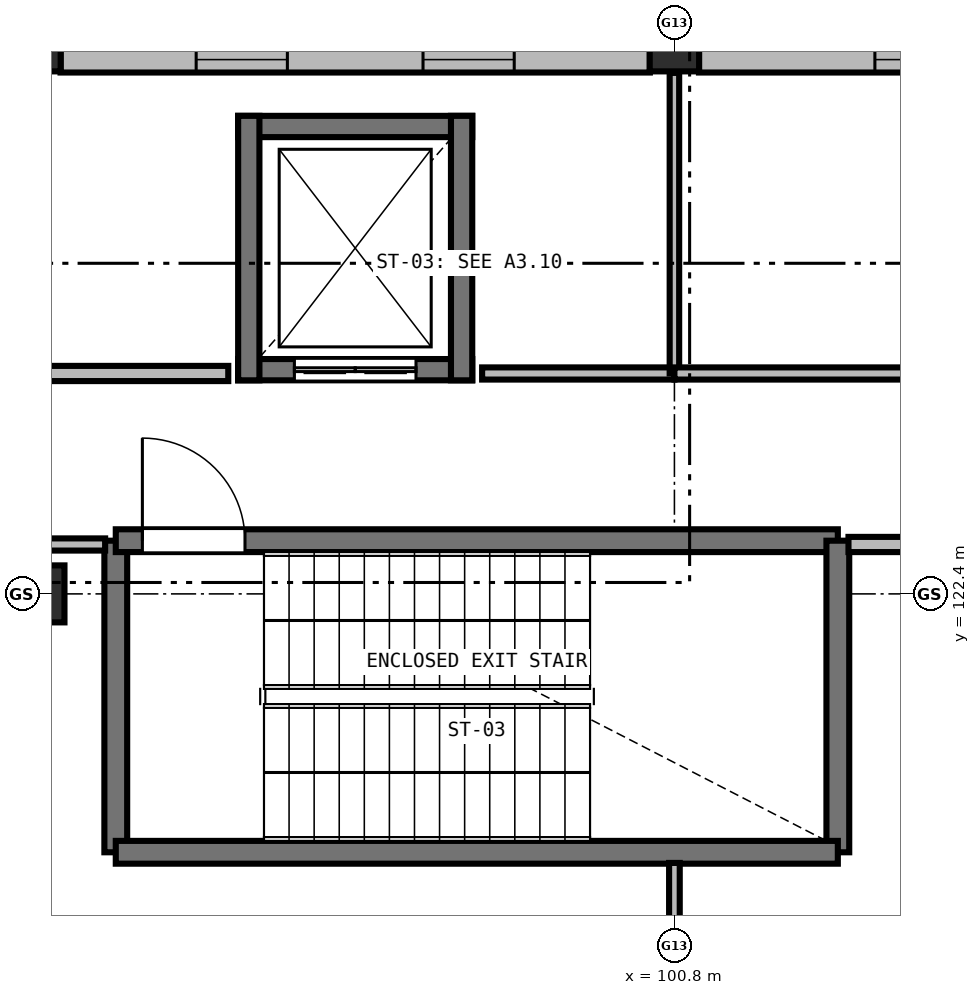
"""IFC4 building model, lengths in metres.
Left out: names, types, materials, properties, quantities, classifications, styles, units other than length and angle.
Written with IfcOpenShell. Run it as: python <this file> out.ifc"""

import sys

from ifc_helpers import new_model, si_unit, direction, frame, frame_2d, origin, origin_2d, place, context, subcontext, project, spatial, rectangle, extrude, element, fill, save


model = new_model("IFC4")
c1 = context("Model", 3, precision=1e-05, world=origin(), true_north=direction((0.0, 1.0)))
c2 = subcontext(c1, "Body", "Model", "MODEL_VIEW")
j1 = project(units=[si_unit("LENGTHUNIT", "METRE"), si_unit("PLANEANGLEUNIT", "RADIAN")], contexts=[c1])
p1 = place(None, origin())
s1 = spatial("IfcSite", under=j1, at=p1, CompositionType="ELEMENT")
p2 = place(p1, origin())
s2 = spatial("IfcBuilding", under=s1, at=p2, CompositionType="ELEMENT")
p3 = place(p2, frame((0.0, 0.0, 9.3)))
s3 = spatial("IfcBuildingStorey", under=s2, at=p3, CompositionType="ELEMENT", Elevation=9.3)
p4 = place(p3, frame((92.4, 122.4, 0.0), z_axis=(0.0, 0.0, 1.0), x_axis=(1.0, 0.0, 0.0)))
e1 = element("IfcColumn", 1, at=p4, inside=s3, PredefinedType="COLUMN", context=c2, shape_type="SweptSolid", body=[
    extrude(rectangle(XDim=0.75, YDim=0.75, at=origin_2d()), origin(), (0.0, 0.0, 1.0), 4.2),
])
for number, where, z_axis, x_axis in (
    (2, (92.4, 129.6, 0.0), (0.0, 0.0, 1.0), (1.0, 0.0, 0.0)),
    (3, (100.8, 129.6, 0.0), (0.0, 0.0, 1.0), (1.0, 0.0, 0.0)),
):
    element("IfcColumn", number, at=place(p3, frame(where, z_axis=z_axis, x_axis=x_axis)), inside=s3, PredefinedType="COLUMN", context=c2, shape_type="SweptSolid", body=[
        extrude(rectangle(XDim=0.65, YDim=0.65, at=origin_2d()), origin(), (0.0, 0.0, 1.0), 4.2),
    ])
p5 = place(p3, frame((92.723, 129.43, 0.0), z_axis=(0.0, 0.0, 1.0), x_axis=(1.0, 0.0, 0.0)))
e4 = element("IfcWall", 4, at=p5, inside=s3, PredefinedType="SOLIDWALL", context=c2, shape_type="SweptSolid", body=[
    extrude(rectangle(XDim=7.754, YDim=0.34, at=frame_2d((3.877, 0.0))), origin(), (0.0, 0.0, 1.0), 3.18),
])
p6 = place(p5, frame((1.785, 0.0, 0.95)))
e5 = element("IfcOpeningElement", 5, at=p6, cuts=e4, PredefinedType="OPENING", context=c2, shape_type="SweptSolid", body=[
    extrude(rectangle(XDim=1.2, YDim=1.8, at=frame_2d((0.6, 0.9))), frame((0.0, 0.18, 0.0), z_axis=(0.0, -1.0, 0.0), x_axis=(1.0, 0.0, 0.0)), (0.0, 0.0, 1.0), 0.36),
])
p7 = place(p5, frame((4.769, 0.0, 0.95)))
e6 = element("IfcOpeningElement", 6, at=p7, cuts=e4, PredefinedType="OPENING", context=c2, shape_type="SweptSolid", body=[
    extrude(rectangle(XDim=1.2, YDim=1.8, at=frame_2d((0.6, 0.9))), frame((0.0, 0.18, 0.0), z_axis=(0.0, -1.0, 0.0), x_axis=(1.0, 0.0, 0.0)), (0.0, 0.0, 1.0), 0.36),
])
p8 = place(p3, frame((101.123, 129.43, 0.0), z_axis=(0.0, 0.0, 1.0), x_axis=(1.0, 0.0, 0.0)))
e7 = element("IfcWall", 7, at=p8, inside=s3, PredefinedType="SOLIDWALL", context=c2, shape_type="SweptSolid", body=[
    extrude(rectangle(XDim=7.829, YDim=0.34, at=frame_2d((3.915, 0.0))), origin(), (0.0, 0.0, 1.0), 3.18),
])
p9 = place(p8, frame((2.314, 0.0, 0.95)))
e8 = element("IfcOpeningElement", 8, at=p9, cuts=e7, PredefinedType="OPENING", context=c2, shape_type="SweptSolid", body=[
    extrude(rectangle(XDim=3.2, YDim=1.98, at=frame_2d((1.6, 0.99))), frame((0.0, 0.18, 0.0), z_axis=(0.0, -1.0, 0.0), x_axis=(1.0, 0.0, 0.0)), (0.0, 0.0, 1.0), 0.36),
])
p10 = place(p3, frame((93.45, 119.0, 0.0), z_axis=(0.0, 0.0, 1.0), x_axis=(0.0, 1.0, 0.0)))
e9 = element("IfcWall", 9, at=p10, inside=s3, PredefinedType="SHEAR", context=c2, shape_type="SweptSolid", body=[
    extrude(rectangle(XDim=4.1, YDim=0.3, at=frame_2d((2.05, 0.0))), origin(), (0.0, 0.0, 1.0), 3.94),
])
p11 = place(p3, frame((93.45, 123.1, 0.0), z_axis=(0.0, 0.0, 1.0), x_axis=(1.0, 0.0, 0.0)))
e10 = element("IfcWall", 10, at=p11, inside=s3, PredefinedType="SHEAR", context=c2, shape_type="SweptSolid", body=[
    extrude(rectangle(XDim=9.5, YDim=0.3, at=frame_2d((4.75, 0.0))), origin(), (0.0, 0.0, 1.0), 3.94),
])
p12 = place(p11, frame((0.35, 0.0, 0.0)))
e11 = element("IfcOpeningElement", 11, at=p12, cuts=e10, PredefinedType="OPENING", context=c2, shape_type="SweptSolid", body=[
    extrude(rectangle(XDim=1.35, YDim=2.2, at=frame_2d((0.675, 1.1))), frame((0.0, 0.16, 0.0), z_axis=(0.0, -1.0, 0.0), x_axis=(1.0, 0.0, 0.0)), (0.0, 0.0, 1.0), 0.32),
])
p13 = place(p3, frame((102.95, 123.1, 0.0), z_axis=(0.0, 0.0, 1.0), x_axis=(0.0, -1.0, 0.0)))
e12 = element("IfcWall", 12, at=p13, inside=s3, PredefinedType="SHEAR", context=c2, shape_type="SweptSolid", body=[
    extrude(rectangle(XDim=4.1, YDim=0.3, at=frame_2d((2.05, 0.0))), origin(), (0.0, 0.0, 1.0), 3.94),
])
p14 = place(p3, frame((102.95, 119.0, 0.0), z_axis=(0.0, 0.0, 1.0), x_axis=(-1.0, 0.0, 0.0)))
e13 = element("IfcWall", 13, at=p14, inside=s3, PredefinedType="SHEAR", context=c2, shape_type="SweptSolid", body=[
    extrude(rectangle(XDim=9.5, YDim=0.3, at=frame_2d((4.75, 0.0))), origin(), (0.0, 0.0, 1.0), 3.94),
])
p15 = place(p3, frame((98.14, 125.35, 0.0), z_axis=(0.0, 0.0, 1.0), x_axis=(-1.0, 0.0, 0.0)))
e14 = element("IfcWall", 14, at=p15, inside=s3, PredefinedType="SHEAR", context=c2, shape_type="SweptSolid", body=[
    extrude(rectangle(XDim=3.08, YDim=0.28, at=frame_2d((1.54, 0.0))), origin(), (0.0, 0.0, 1.0), 3.94),
])
p16 = place(p15, frame((0.74, 0.0, 0.0)))
e15 = element("IfcOpeningElement", 15, at=p16, cuts=e14, PredefinedType="OPENING", context=c2, shape_type="SweptSolid", body=[
    extrude(rectangle(XDim=1.6, YDim=2.2, at=frame_2d((0.8, 1.1))), frame((0.0, 0.15, 0.0), z_axis=(0.0, -1.0, 0.0), x_axis=(1.0, 0.0, 0.0)), (0.0, 0.0, 1.0), 0.3),
])
p17 = place(p3, frame((95.06, 128.55, 0.0), z_axis=(0.0, 0.0, 1.0), x_axis=(1.0, 0.0, 0.0)))
e16 = element("IfcWall", 16, at=p17, inside=s3, PredefinedType="SHEAR", context=c2, shape_type="SweptSolid", body=[
    extrude(rectangle(XDim=3.08, YDim=0.28, at=frame_2d((1.54, 0.0))), origin(), (0.0, 0.0, 1.0), 3.94),
])
for number, where, z_axis, x_axis in (
    (17, (95.2, 125.21, 0.0), (0.0, 0.0, 1.0), (0.0, 1.0, 0.0)),
    (18, (98.0, 128.69, 0.0), (0.0, 0.0, 1.0), (0.0, -1.0, 0.0)),
):
    element("IfcWall", number, at=place(p3, frame(where, z_axis=z_axis, x_axis=x_axis)), inside=s3, PredefinedType="SHEAR", context=c2, shape_type="SweptSolid", body=[
        extrude(rectangle(XDim=3.48, YDim=0.28, at=frame_2d((1.74, 0.0))), origin(), (0.0, 0.0, 1.0), 3.94),
    ])
p18 = place(p3, frame((58.8, 125.3, 0.0), z_axis=(0.0, 0.0, 1.0), x_axis=(1.0, 0.0, 0.0)))
e19 = element("IfcWall", 19, at=p18, inside=s3, PredefinedType="SOLIDWALL", context=c2, shape_type="SweptSolid", body=[
    extrude(rectangle(XDim=36.13, YDim=0.2, at=frame_2d((18.065, 0.0))), origin(), (0.0, 0.0, 1.0), 3.325),
])
p19 = place(p18, frame((3.625, 0.0, 0.0)))
e20 = element("IfcOpeningElement", 20, at=p19, cuts=e19, PredefinedType="OPENING", context=c2, shape_type="SweptSolid", body=[
    extrude(rectangle(XDim=1.15, YDim=2.15, at=frame_2d((0.575, 1.075))), frame((0.0, 0.11, 0.0), z_axis=(0.0, -1.0, 0.0), x_axis=(1.0, 0.0, 0.0)), (0.0, 0.0, 1.0), 0.22),
])
p20 = place(p3, frame((98.27, 125.3, 0.0), z_axis=(0.0, 0.0, 1.0), x_axis=(1.0, 0.0, 0.0)))
e21 = element("IfcWall", 21, at=p20, inside=s3, PredefinedType="PARTITIONING", context=c2, shape_type="SweptSolid", body=[
    extrude(rectangle(XDim=2.53, YDim=0.16, at=frame_2d((1.265, 0.0))), origin(), (0.0, 0.0, 1.0), 3.85),
])
p21 = place(p3, frame((100.8, 125.3, 0.0), z_axis=(0.0, 0.0, 1.0), x_axis=(0.0, 1.0, 0.0)))
e22 = element("IfcWall", 22, at=p21, inside=s3, PredefinedType="PARTITIONING", context=c2, shape_type="SweptSolid", body=[
    extrude(rectangle(XDim=3.955, YDim=0.125, at=frame_2d((1.978, 0.0))), origin(), (0.0, 0.0, 1.0), 3.175),
])
p22 = place(p3, frame((100.8, 125.3, 0.0), z_axis=(0.0, 0.0, 1.0), x_axis=(1.0, 0.0, 0.0)))
e23 = element("IfcWall", 23, at=p22, inside=s3, PredefinedType="PARTITIONING", context=c2, shape_type="SweptSolid", body=[
    extrude(rectangle(XDim=33.38, YDim=0.16, at=frame_2d((16.69, 0.0))), origin(), (0.0, 0.0, 1.0), 3.325),
])
p23 = place(p22, frame((3.375, 0.0, 0.0)))
e24 = element("IfcOpeningElement", 24, at=p23, cuts=e23, PredefinedType="OPENING", context=c2, shape_type="SweptSolid", body=[
    extrude(rectangle(XDim=1.65, YDim=2.2, at=frame_2d((0.825, 1.1))), frame((0.0, 0.09, 0.0), z_axis=(0.0, -1.0, 0.0), x_axis=(1.0, 0.0, 0.0)), (0.0, 0.0, 1.0), 0.18),
])
p24 = place(p3, frame((93.31, 123.05, 0.0), z_axis=(0.0, 0.0, 1.0), x_axis=(-1.0, 0.0, 0.0)))
e25 = element("IfcWall", 25, at=p24, inside=s3, PredefinedType="PARTITIONING", context=c2, shape_type="SweptSolid", body=[
    extrude(rectangle(XDim=32.22, YDim=0.16, at=frame_2d((16.11, 0.0))), origin(), (0.0, 0.0, 1.0), 3.325),
])
p25 = place(p24, frame((27.435, 0.0, 0.0)))
e26 = element("IfcOpeningElement", 26, at=p25, cuts=e25, PredefinedType="OPENING", context=c2, shape_type="SweptSolid", body=[
    extrude(rectangle(XDim=1.55, YDim=2.2, at=frame_2d((0.775, 1.1))), frame((0.0, 0.09, 0.0), z_axis=(0.0, -1.0, 0.0), x_axis=(1.0, 0.0, 0.0)), (0.0, 0.0, 1.0), 0.18),
])
p26 = place(p3, frame((100.8, 115.595, 0.0), z_axis=(0.0, 0.0, 1.0), x_axis=(0.0, 1.0, 0.0)))
e27 = element("IfcWall", 27, at=p26, inside=s3, PredefinedType="PARTITIONING", context=c2, shape_type="SweptSolid", body=[
    extrude(rectangle(XDim=3.265, YDim=0.14, at=frame_2d((1.633, 0.0))), origin(), (0.0, 0.0, 1.0), 3.175),
])
p27 = place(p3, frame((134.18, 123.05, 0.0), z_axis=(0.0, 0.0, 1.0), x_axis=(-1.0, 0.0, 0.0)))
e28 = element("IfcWall", 28, at=p27, inside=s3, PredefinedType="SOLIDWALL", context=c2, shape_type="SweptSolid", body=[
    extrude(rectangle(XDim=31.09, YDim=0.2, at=frame_2d((15.545, 0.0))), origin(), (0.0, 0.0, 1.0), 3.325),
])
p28 = place(p27, frame((28.58, 0.0, 0.0)))
e29 = element("IfcOpeningElement", 29, at=p28, cuts=e28, PredefinedType="OPENING", context=c2, shape_type="SweptSolid", body=[
    extrude(rectangle(XDim=1.2, YDim=2.15, at=frame_2d((0.6, 1.075))), frame((0.0, 0.11, 0.0), z_axis=(0.0, -1.0, 0.0), x_axis=(1.0, 0.0, 0.0)), (0.0, 0.0, 1.0), 0.22),
])
p29 = place(p6, origin())
e30 = element("IfcWindow", 30, at=p29, inside=s3, PartitioningType="SINGLE_PANEL", PredefinedType="WINDOW", context=c2, shape_type="SweptSolid", body=[
    extrude(rectangle(XDim=1.2, YDim=1.8, at=frame_2d((0.6, 0.9))), frame((0.0, 0.03, 0.0), z_axis=(0.0, -1.0, 0.0), x_axis=(1.0, 0.0, 0.0)), (0.0, 0.0, 1.0), 0.06),
])
fill(e5, e30)
p30 = place(p7, origin())
e31 = element("IfcWindow", 31, at=p30, inside=s3, PartitioningType="SINGLE_PANEL", PredefinedType="WINDOW", context=c2, shape_type="SweptSolid", body=[
    extrude(rectangle(XDim=1.2, YDim=1.8, at=frame_2d((0.6, 0.9))), frame((0.0, 0.03, 0.0), z_axis=(0.0, -1.0, 0.0), x_axis=(1.0, 0.0, 0.0)), (0.0, 0.0, 1.0), 0.06),
])
fill(e6, e31)
p31 = place(p9, origin())
e32 = element("IfcWindow", 32, at=p31, inside=s3, PartitioningType="SINGLE_PANEL", PredefinedType="WINDOW", context=c2, shape_type="SweptSolid", body=[
    extrude(rectangle(XDim=3.2, YDim=1.98, at=frame_2d((1.6, 0.99))), frame((0.0, 0.03, 0.0), z_axis=(0.0, -1.0, 0.0), x_axis=(1.0, 0.0, 0.0)), (0.0, 0.0, 1.0), 0.06),
])
fill(e8, e32)
p32 = place(p12, origin())
e33 = element("IfcDoor", 33, at=p32, inside=s3, OperationType="SINGLE_SWING_LEFT", PredefinedType="DOOR", context=c2, shape_type="SweptSolid", body=[
    extrude(rectangle(XDim=1.35, YDim=2.2, at=frame_2d((0.675, 1.1))), frame((0.0, 0.025, 0.0), z_axis=(0.0, -1.0, 0.0), x_axis=(1.0, 0.0, 0.0)), (0.0, 0.0, 1.0), 0.05),
])
fill(e11, e33)
p33 = place(p16, origin())
e34 = element("IfcDoor", 34, at=p33, inside=s3, OperationType="DOUBLE_DOOR_SLIDING", PredefinedType="DOOR", context=c2, shape_type="SweptSolid", body=[
    extrude(rectangle(XDim=1.6, YDim=2.2, at=frame_2d((0.8, 1.1))), frame((0.0, 0.025, 0.0), z_axis=(0.0, -1.0, 0.0), x_axis=(1.0, 0.0, 0.0)), (0.0, 0.0, 1.0), 0.05),
])
fill(e15, e34)
save(model, sys.argv[1])
